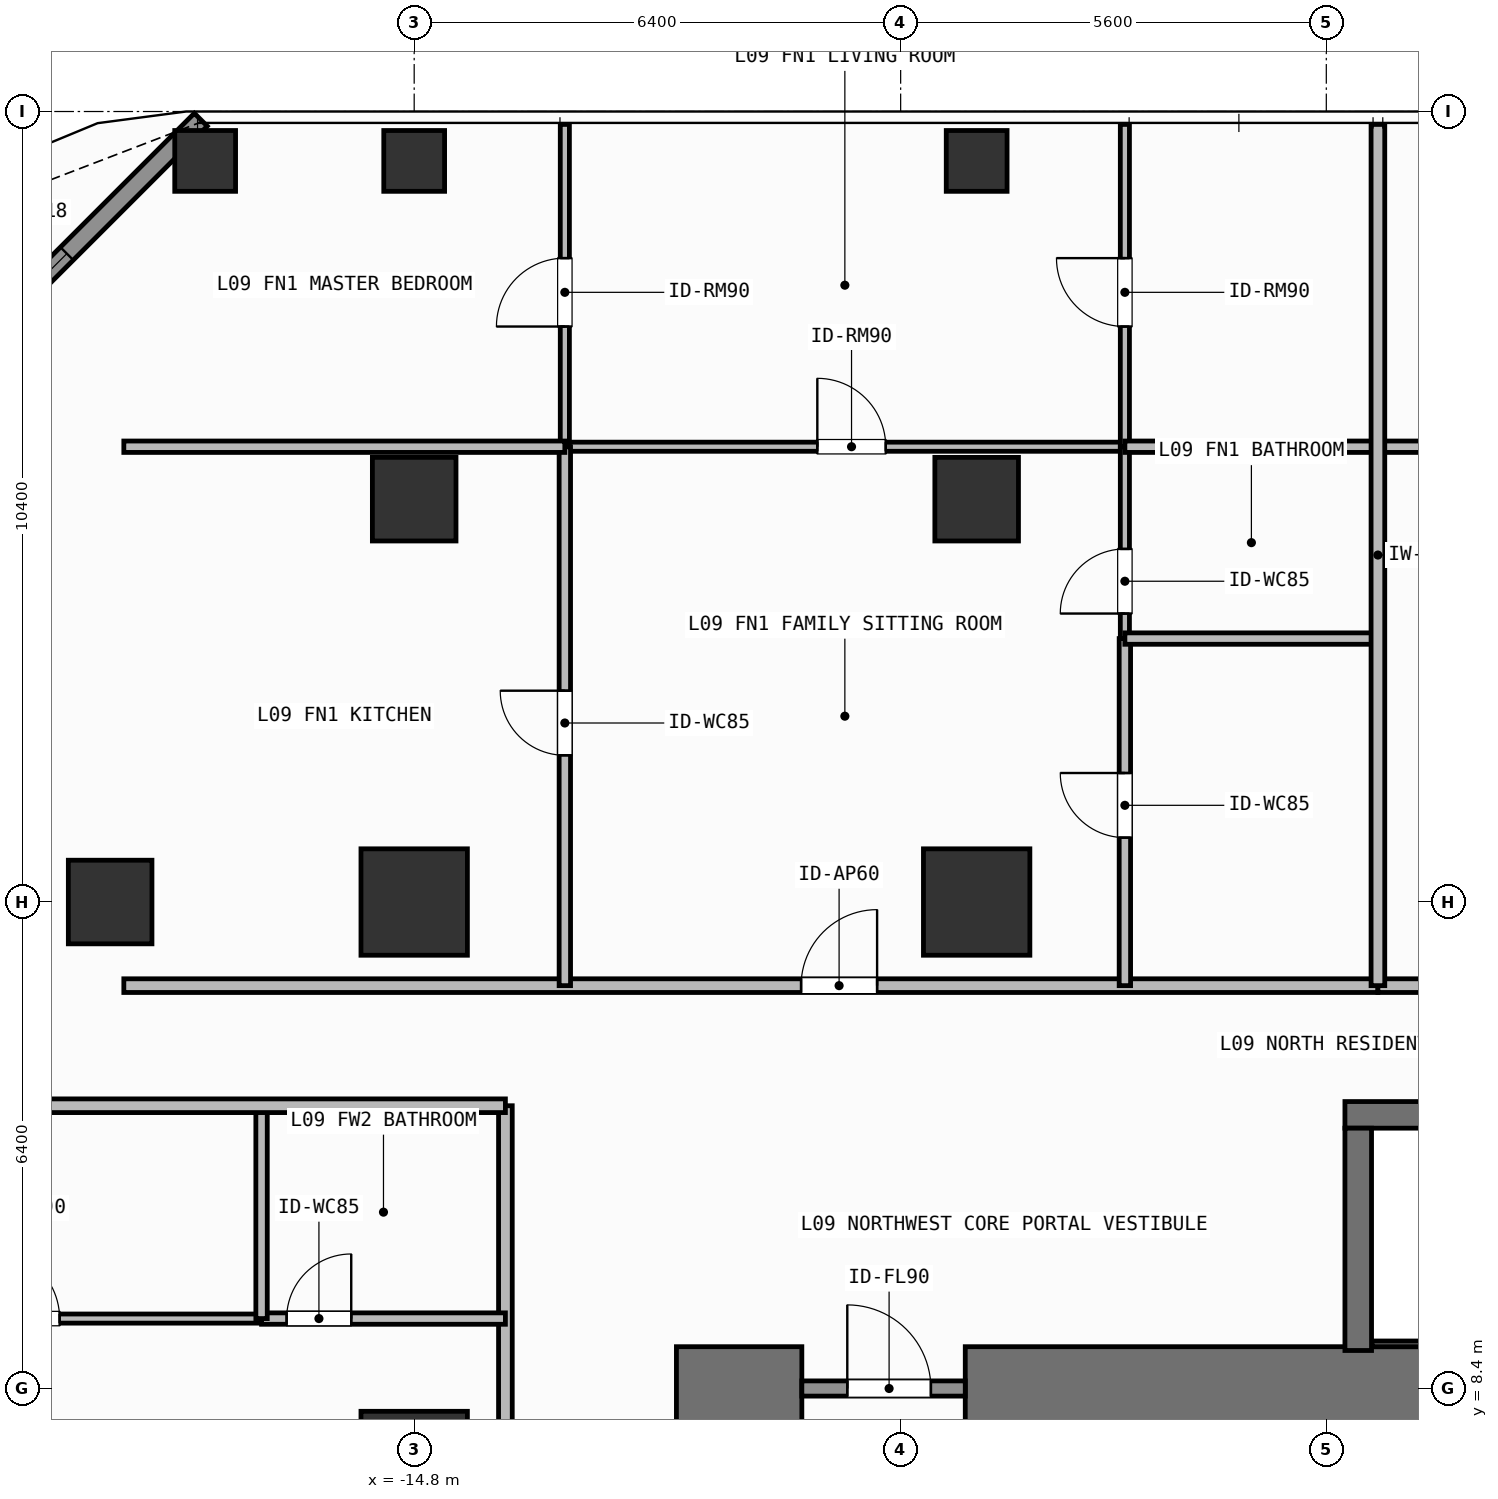
"""IFC4 building model, lengths in metres.
Left out: names, types, materials, properties, quantities, classifications, styles, units other than length and angle.
Written with IfcOpenShell. Run it as: python <this file> out.ifc"""

import sys

from ifc_helpers import new_model, si_unit, direction, frame, frame_2d, origin, origin_2d, place, context, subcontext, project, spatial, rectangle, hollow_rectangle, extrude, element, fill, save


model = new_model("IFC4")
c1 = context("Model", 3, precision=1e-05, world=origin(), true_north=direction((0.0, 1.0)))
c2 = subcontext(c1, "Body", "Model", "MODEL_VIEW")
j1 = project(units=[si_unit("LENGTHUNIT", "METRE"), si_unit("PLANEANGLEUNIT", "RADIAN")], contexts=[c1])
p1 = place(None, origin())
s1 = spatial("IfcSite", under=j1, at=p1, CompositionType="ELEMENT")
p2 = place(p1, origin())
s2 = spatial("IfcBuilding", under=s1, at=p2, CompositionType="ELEMENT")
p3 = place(p2, frame((0.0, 0.0, 34.5)))
s3 = spatial("IfcBuildingStorey", under=s2, at=p3, CompositionType="ELEMENT", Elevation=34.5)
p4 = place(p3, frame((-11.35, 8.4, 0.0), z_axis=(0.0, 0.0, 1.0), x_axis=(1.0, 0.0, 0.0)))
e1 = element("IfcWall", 1, at=p4, inside=s3, PredefinedType="SHEAR", context=c2, shape_type="SweptSolid", body=[
    extrude(rectangle(XDim=1.65, YDim=1.1, at=frame_2d((0.825, 0.0))), origin(), (0.0, 0.0, 1.0), 3.9),
])
p5 = place(p3, frame((-7.55, 8.4, 0.0), z_axis=(0.0, 0.0, 1.0), x_axis=(1.0, 0.0, 0.0)))
e2 = element("IfcWall", 2, at=p5, inside=s3, PredefinedType="SHEAR", context=c2, shape_type="SweptSolid", body=[
    extrude(rectangle(XDim=16.5, YDim=1.1, at=frame_2d((8.25, 0.0))), origin(), (0.0, 0.0, 1.0), 3.9),
])
p6 = place(p3, frame((-2.555, 12.0, 0.0), z_axis=(0.0, 0.0, 1.0), x_axis=(1.0, 0.0, 0.0)))
e3 = element("IfcWall", 3, at=p6, inside=s3, PredefinedType="SHEAR", context=c2, shape_type="SweptSolid", body=[
    extrude(rectangle(XDim=7.31, YDim=0.35, at=frame_2d((3.655, 0.0))), origin(), (0.0, 0.0, 1.0), 3.9),
])
p7 = place(p3, frame((-2.2, 8.988, 0.0), z_axis=(0.0, 0.0, 1.0), x_axis=(1.0, 0.0, 0.0)))
e4 = element("IfcWall", 4, at=p7, inside=s3, PredefinedType="SHEAR", context=c2, shape_type="SweptSolid", body=[
    extrude(rectangle(XDim=6.6, YDim=0.075, at=frame_2d((3.3, 0.0))), origin(), (0.0, 0.0, 1.0), 3.9),
])
p8 = place(p3, frame((-2.38, 8.9, 0.0), z_axis=(0.0, 0.0, 1.0), x_axis=(0.0, 1.0, 0.0)))
e5 = element("IfcWall", 5, at=p8, inside=s3, PredefinedType="SHEAR", context=c2, shape_type="SweptSolid", body=[
    extrude(rectangle(XDim=2.925, YDim=0.35, at=frame_2d((1.462, 0.0))), origin(), (0.0, 0.0, 1.0), 3.9),
])
for number, where, z_axis, x_axis in (
    (6, (-14.8, 14.8, 0.0), (0.0, 0.0, 1.0), (1.0, 0.0, 0.0)),
    (7, (-7.4, 14.8, 0.0), (0.0, 0.0, 1.0), (1.0, 0.0, 0.0)),
    (8, (-14.8, 7.4, 0.0), (0.0, 0.0, 1.0), (1.0, 0.0, 0.0)),
):
    element("IfcColumn", number, at=place(p3, frame(where, z_axis=z_axis, x_axis=x_axis)), inside=s3, PredefinedType="COLUMN", context=c2, shape_type="SweptSolid", body=[
        extrude(rectangle(XDim=1.4, YDim=1.4, at=origin_2d()), origin(), (0.0, 0.0, 1.0), 3.9),
    ])
for number, where, z_axis, x_axis in (
    (9, (-18.8, 14.8, 0.0), (0.0, 0.0, 1.0), (1.0, 0.0, 0.0)),
    (10, (-14.8, 20.1, 0.0), (0.0, 0.0, 1.0), (1.0, 0.0, 0.0)),
    (11, (-7.4, 20.1, 0.0), (0.0, 0.0, 1.0), (1.0, 0.0, 0.0)),
):
    element("IfcColumn", number, at=place(p3, frame(where, z_axis=z_axis, x_axis=x_axis)), inside=s3, PredefinedType="COLUMN", context=c2, shape_type="SweptSolid", body=[
        extrude(rectangle(XDim=1.1, YDim=1.1, at=origin_2d()), origin(), (0.0, 0.0, 1.0), 3.9),
    ])
for number, where, z_axis, x_axis in (
    (12, (-17.55, 24.55, 0.0), (0.0, 0.0, 1.0), (1.0, 0.0, 0.0)),
    (13, (-14.8, 24.55, 0.0), (0.0, 0.0, 1.0), (1.0, 0.0, 0.0)),
    (14, (-7.4, 24.55, 0.0), (0.0, 0.0, 1.0), (1.0, 0.0, 0.0)),
):
    element("IfcColumn", number, at=place(p3, frame(where, z_axis=z_axis, x_axis=x_axis)), inside=s3, PredefinedType="COLUMN", context=c2, shape_type="SweptSolid", body=[
        extrude(hollow_rectangle(XDim=0.8, YDim=0.8, WallThickness=0.036, at=origin_2d()), origin(), (0.0, 0.0, 1.0), 3.9),
    ])
p9 = place(p3, frame((-22.192, 20.508, 0.0), z_axis=(0.0, 0.0, 1.0), x_axis=(0.707106781187, 0.707106781187, 0.0)))
e15 = element("IfcWall", 15, at=p9, inside=s3, PredefinedType="SOLIDWALL", context=c2, shape_type="SweptSolid", body=[
    extrude(rectangle(XDim=6.484, YDim=0.24, at=frame_2d((3.242, 0.0))), origin(), (0.0, 0.0, 1.0), 3.68),
])
p10 = place(p9, frame((2.492, 0.0, 0.8)))
e16 = element("IfcOpeningElement", 16, at=p10, cuts=e15, PredefinedType="OPENING", context=c2, shape_type="SweptSolid", body=[
    extrude(rectangle(XDim=1.5, YDim=1.85, at=frame_2d((0.75, 0.925))), frame((0.0, 0.13, 0.0), z_axis=(0.0, -1.0, 0.0), x_axis=(1.0, 0.0, 0.0)), (0.0, 0.0, 1.0), 0.26),
])
p11 = place(p3, frame((-9.7, 8.4, 0.0), z_axis=(0.0, 0.0, 1.0), x_axis=(1.0, 0.0, 0.0)))
e17 = element("IfcWall", 17, at=p11, inside=s3, PredefinedType="SOLIDWALL", context=c2, shape_type="SweptSolid", body=[
    extrude(rectangle(XDim=2.15, YDim=0.2, at=frame_2d((1.075, 0.0))), origin(), (0.0, 0.0, 1.0), 2.72),
])
p12 = place(p11, frame((0.598, 0.0, 0.0)))
e18 = element("IfcOpeningElement", 18, at=p12, cuts=e17, PredefinedType="OPENING", context=c2, shape_type="SweptSolid", body=[
    extrude(rectangle(XDim=1.1, YDim=2.15, at=frame_2d((0.55, 1.075))), frame((0.0, 0.11, 0.0), z_axis=(0.0, -1.0, 0.0), x_axis=(1.0, 0.0, 0.0)), (0.0, 0.0, 1.0), 0.22),
])
p13 = place(p3, frame((-18.62, 13.7, 0.0), z_axis=(0.0, 0.0, 1.0), x_axis=(1.0, 0.0, 0.0)))
e19 = element("IfcWall", 19, at=p13, inside=s3, PredefinedType="PARTITIONING", context=c2, shape_type="SweptSolid", body=[
    extrude(rectangle(XDim=16.499, YDim=0.18, at=frame_2d((8.25, 0.0))), origin(), (0.0, 0.0, 1.0), 3.68),
])
p14 = place(p13, frame((8.91, 0.0, 0.0)))
e20 = element("IfcOpeningElement", 20, at=p14, cuts=e19, PredefinedType="OPENING", context=c2, shape_type="SweptSolid", body=[
    extrude(rectangle(XDim=1.0, YDim=2.2, at=frame_2d((0.5, 1.1))), frame((0.0, 0.1, 0.0), z_axis=(0.0, -1.0, 0.0), x_axis=(1.0, 0.0, 0.0)), (0.0, 0.0, 1.0), 0.2),
])
p15 = place(p3, frame((-12.818, 20.79, 0.0), z_axis=(0.0, 0.0, 1.0), x_axis=(1.0, 0.0, 0.0)))
e21 = element("IfcWall", 21, at=p15, inside=s3, PredefinedType="PARTITIONING", context=c2, shape_type="SweptSolid", body=[
    extrude(rectangle(XDim=7.368, YDim=0.12, at=frame_2d((3.684, 0.0))), origin(), (0.0, 0.0, 1.0), 3.68),
])
p16 = place(p15, frame((3.322, 0.0, 0.0)))
e22 = element("IfcOpeningElement", 22, at=p16, cuts=e21, PredefinedType="OPENING", context=c2, shape_type="SweptSolid", body=[
    extrude(rectangle(XDim=0.9, YDim=2.1, at=frame_2d((0.45, 1.05))), frame((0.0, 0.07, 0.0), z_axis=(0.0, -1.0, 0.0), x_axis=(1.0, 0.0, 0.0)), (0.0, 0.0, 1.0), 0.14),
])
p17 = place(p3, frame((-12.818, 13.7, 0.0), z_axis=(0.0, 0.0, 1.0), x_axis=(0.0, 1.0, 0.0)))
e23 = element("IfcWall", 23, at=p17, inside=s3, PredefinedType="PARTITIONING", context=c2, shape_type="SweptSolid", body=[
    extrude(rectangle(XDim=7.09, YDim=0.15, at=frame_2d((3.545, 0.0))), origin(), (0.0, 0.0, 1.0), 3.68),
])
p18 = place(p17, frame((3.03, 0.0, 0.0)))
e24 = element("IfcOpeningElement", 24, at=p18, cuts=e23, PredefinedType="OPENING", context=c2, shape_type="SweptSolid", body=[
    extrude(rectangle(XDim=0.85, YDim=2.1, at=frame_2d((0.425, 1.05))), frame((0.0, 0.085, 0.0), z_axis=(0.0, -1.0, 0.0), x_axis=(1.0, 0.0, 0.0)), (0.0, 0.0, 1.0), 0.17),
])
p19 = place(p3, frame((-12.818, 20.79, 0.0), z_axis=(0.0, 0.0, 1.0), x_axis=(0.0, 1.0, 0.0)))
e25 = element("IfcWall", 25, at=p19, inside=s3, PredefinedType="PARTITIONING", context=c2, shape_type="SweptSolid", body=[
    extrude(rectangle(XDim=4.24, YDim=0.12, at=frame_2d((2.12, 0.0))), origin(), (0.0, 0.0, 1.0), 3.68),
])
p20 = place(p19, frame((1.581, 0.0, 0.0)))
e26 = element("IfcOpeningElement", 26, at=p20, cuts=e25, PredefinedType="OPENING", context=c2, shape_type="SweptSolid", body=[
    extrude(rectangle(XDim=0.9, YDim=2.1, at=frame_2d((0.45, 1.05))), frame((0.0, 0.07, 0.0), z_axis=(0.0, -1.0, 0.0), x_axis=(1.0, 0.0, 0.0)), (0.0, 0.0, 1.0), 0.14),
])
p21 = place(p3, frame((-5.45, 13.7, 0.0), z_axis=(0.0, 0.0, 1.0), x_axis=(0.0, 1.0, 0.0)))
e27 = element("IfcWall", 27, at=p21, inside=s3, PredefinedType="PARTITIONING", context=c2, shape_type="SweptSolid", body=[
    extrude(rectangle(XDim=4.566, YDim=0.15, at=frame_2d((2.283, 0.0))), origin(), (0.0, 0.0, 1.0), 3.68),
])
p22 = place(p21, frame((1.948, 0.0, 0.0)))
e28 = element("IfcOpeningElement", 28, at=p22, cuts=e27, PredefinedType="OPENING", context=c2, shape_type="SweptSolid", body=[
    extrude(rectangle(XDim=0.85, YDim=2.1, at=frame_2d((0.425, 1.05))), frame((0.0, 0.085, 0.0), z_axis=(0.0, -1.0, 0.0), x_axis=(1.0, 0.0, 0.0)), (0.0, 0.0, 1.0), 0.17),
])
p23 = place(p3, frame((-5.45, 18.266, 0.0), z_axis=(0.0, 0.0, 1.0), x_axis=(0.0, 1.0, 0.0)))
e29 = element("IfcWall", 29, at=p23, inside=s3, PredefinedType="PARTITIONING", context=c2, shape_type="SweptSolid", body=[
    extrude(rectangle(XDim=2.524, YDim=0.12, at=frame_2d((1.262, 0.0))), origin(), (0.0, 0.0, 1.0), 3.68),
])
p24 = place(p23, frame((0.329, 0.0, 0.0)))
e30 = element("IfcOpeningElement", 30, at=p24, cuts=e29, PredefinedType="OPENING", context=c2, shape_type="SweptSolid", body=[
    extrude(rectangle(XDim=0.85, YDim=2.1, at=frame_2d((0.425, 1.05))), frame((0.0, 0.07, 0.0), z_axis=(0.0, -1.0, 0.0), x_axis=(1.0, 0.0, 0.0)), (0.0, 0.0, 1.0), 0.14),
])
p25 = place(p3, frame((-5.45, 20.79, 0.0), z_axis=(0.0, 0.0, 1.0), x_axis=(0.0, 1.0, 0.0)))
e31 = element("IfcWall", 31, at=p25, inside=s3, PredefinedType="PARTITIONING", context=c2, shape_type="SweptSolid", body=[
    extrude(rectangle(XDim=4.24, YDim=0.12, at=frame_2d((2.12, 0.0))), origin(), (0.0, 0.0, 1.0), 3.68),
])
p26 = place(p25, frame((1.581, 0.0, 0.0)))
e32 = element("IfcOpeningElement", 32, at=p26, cuts=e31, PredefinedType="OPENING", context=c2, shape_type="SweptSolid", body=[
    extrude(rectangle(XDim=0.9, YDim=2.1, at=frame_2d((0.45, 1.05))), frame((0.0, 0.07, 0.0), z_axis=(0.0, -1.0, 0.0), x_axis=(1.0, 0.0, 0.0)), (0.0, 0.0, 1.0), 0.14),
])
p27 = place(p3, frame((-2.121, 13.7, 0.0), z_axis=(0.0, 0.0, 1.0), x_axis=(1.0, 0.0, 0.0)))
e33 = element("IfcWall", 33, at=p27, inside=s3, PredefinedType="PARTITIONING", context=c2, shape_type="SweptSolid", body=[
    extrude(rectangle(XDim=11.226, YDim=0.18, at=frame_2d((5.613, 0.0))), origin(), (0.0, 0.0, 1.0), 3.68),
])
p28 = place(p27, frame((5.29, 0.0, 0.0)))
e34 = element("IfcOpeningElement", 34, at=p28, cuts=e33, PredefinedType="OPENING", context=c2, shape_type="SweptSolid", body=[
    extrude(rectangle(XDim=1.0, YDim=2.2, at=frame_2d((0.5, 1.1))), frame((0.0, 0.1, 0.0), z_axis=(0.0, -1.0, 0.0), x_axis=(1.0, 0.0, 0.0)), (0.0, 0.0, 1.0), 0.2),
])
p29 = place(p3, frame((-13.6, 0.727, 0.0), z_axis=(0.0, 0.0, 1.0), x_axis=(0.0, 1.0, 0.0)))
e35 = element("IfcWall", 35, at=p29, inside=s3, PredefinedType="PARTITIONING", context=c2, shape_type="SweptSolid", body=[
    extrude(rectangle(XDim=11.393, YDim=0.18, at=frame_2d((5.697, 0.0))), origin(), (0.0, 0.0, 1.0), 3.68),
])
p30 = place(p29, frame((4.837, 0.0, 0.0)))
e36 = element("IfcOpeningElement", 36, at=p30, cuts=e35, PredefinedType="OPENING", context=c2, shape_type="SweptSolid", body=[
    extrude(rectangle(XDim=1.0, YDim=2.2, at=frame_2d((0.5, 1.1))), frame((0.0, 0.1, 0.0), z_axis=(0.0, -1.0, 0.0), x_axis=(1.0, 0.0, 0.0)), (0.0, 0.0, 1.0), 0.2),
])
p31 = place(p3, frame((-16.808, 9.32, 0.0), z_axis=(0.0, 0.0, 1.0), x_axis=(1.0, 0.0, 0.0)))
e37 = element("IfcWall", 37, at=p31, inside=s3, PredefinedType="PARTITIONING", context=c2, shape_type="SweptSolid", body=[
    extrude(rectangle(XDim=3.208, YDim=0.15, at=frame_2d((1.604, 0.0))), origin(), (0.0, 0.0, 1.0), 3.68),
])
p32 = place(p31, frame((0.33, 0.0, 0.0)))
e38 = element("IfcOpeningElement", 38, at=p32, cuts=e37, PredefinedType="OPENING", context=c2, shape_type="SweptSolid", body=[
    extrude(rectangle(XDim=0.85, YDim=2.1, at=frame_2d((0.425, 1.05))), frame((0.0, 0.085, 0.0), z_axis=(0.0, -1.0, 0.0), x_axis=(1.0, 0.0, 0.0)), (0.0, 0.0, 1.0), 0.17),
])
p33 = place(p3, frame((-22.13, 9.32, 0.0), z_axis=(0.0, 0.0, 1.0), x_axis=(1.0, 0.0, 0.0)))
e39 = element("IfcWall", 39, at=p33, inside=s3, PredefinedType="PARTITIONING", context=c2, shape_type="SweptSolid", body=[
    extrude(rectangle(XDim=5.322, YDim=0.12, at=frame_2d((2.661, 0.0))), origin(), (0.0, 0.0, 1.0), 3.68),
])
p34 = place(p33, frame((1.765, 0.0, 0.0)))
e40 = element("IfcOpeningElement", 40, at=p34, cuts=e39, PredefinedType="OPENING", context=c2, shape_type="SweptSolid", body=[
    extrude(rectangle(XDim=0.9, YDim=2.1, at=frame_2d((0.45, 1.05))), frame((0.0, 0.07, 0.0), z_axis=(0.0, -1.0, 0.0), x_axis=(1.0, 0.0, 0.0)), (0.0, 0.0, 1.0), 0.14),
])
p35 = place(p3, frame((-18.62, 20.79, 0.0), z_axis=(0.0, 0.0, 1.0), x_axis=(1.0, 0.0, 0.0)))
e41 = element("IfcWall", 41, at=p35, inside=s3, PredefinedType="PARTITIONING", context=c2, shape_type="SweptSolid", body=[
    extrude(rectangle(XDim=5.802, YDim=0.15, at=frame_2d((2.901, 0.0))), origin(), (0.0, 0.0, 1.0), 3.68),
])
for number, where, z_axis, x_axis in (
    (42, (-5.45, 18.266, 0.0), (0.0, 0.0, 1.0), (1.0, 0.0, 0.0)),
    (43, (-5.45, 20.79, 0.0), (0.0, 0.0, 1.0), (1.0, 0.0, 0.0)),
):
    element("IfcWall", number, at=place(p3, frame(where, z_axis=z_axis, x_axis=x_axis)), inside=s3, PredefinedType="PARTITIONING", context=c2, shape_type="SweptSolid", body=[
        extrude(rectangle(XDim=3.329, YDim=0.15, at=frame_2d((1.665, 0.0))), origin(), (0.0, 0.0, 1.0), 3.68),
    ])
p36 = place(p3, frame((-2.121, 20.79, 0.0), z_axis=(0.0, 0.0, 1.0), x_axis=(1.0, 0.0, 0.0)))
e44 = element("IfcWall", 44, at=p36, inside=s3, PredefinedType="PARTITIONING", context=c2, shape_type="SweptSolid", body=[
    extrude(rectangle(XDim=4.1, YDim=0.15, at=frame_2d((2.05, 0.0))), origin(), (0.0, 0.0, 1.0), 3.68),
])
p37 = place(p3, frame((-2.121, 13.7, 0.0), z_axis=(0.0, 0.0, 1.0), x_axis=(0.0, 1.0, 0.0)))
e45 = element("IfcWall", 45, at=p37, inside=s3, PredefinedType="PARTITIONING", context=c2, shape_type="SweptSolid", body=[
    extrude(rectangle(XDim=11.33, YDim=0.18, at=frame_2d((5.665, 0.0))), origin(), (0.0, 0.0, 1.0), 3.68),
])
p38 = place(p3, frame((-16.808, 9.32, 0.0), z_axis=(0.0, 0.0, 1.0), x_axis=(0.0, 1.0, 0.0)))
e46 = element("IfcWall", 46, at=p38, inside=s3, PredefinedType="PARTITIONING", context=c2, shape_type="SweptSolid", body=[
    extrude(rectangle(XDim=2.8, YDim=0.15, at=frame_2d((1.4, 0.0))), origin(), (0.0, 0.0, 1.0), 3.68),
])
p39 = place(p3, frame((-22.13, 12.12, 0.0), z_axis=(0.0, 0.0, 1.0), x_axis=(1.0, 0.0, 0.0)))
e47 = element("IfcWall", 47, at=p39, inside=s3, PredefinedType="PARTITIONING", context=c2, shape_type="SweptSolid", body=[
    extrude(rectangle(XDim=8.53, YDim=0.18, at=frame_2d((4.265, 0.0))), origin(), (0.0, 0.0, 1.0), 3.68),
])
p40 = place(p10, origin())
e48 = element("IfcWindow", 48, at=p40, inside=s3, PartitioningType="SINGLE_PANEL", PredefinedType="WINDOW", context=c2, shape_type="SweptSolid", body=[
    extrude(rectangle(XDim=1.5, YDim=1.85, at=frame_2d((0.75, 0.925))), frame((0.0, 0.03, 0.0), z_axis=(0.0, -1.0, 0.0), x_axis=(1.0, 0.0, 0.0)), (0.0, 0.0, 1.0), 0.06),
])
fill(e16, e48)
p41 = place(p12, origin())
e49 = element("IfcDoor", 49, at=p41, inside=s3, OperationType="SINGLE_SWING_LEFT", PredefinedType="DOOR", context=c2, shape_type="SweptSolid", body=[
    extrude(rectangle(XDim=1.1, YDim=2.15, at=frame_2d((0.55, 1.075))), frame((0.0, 0.025, 0.0), z_axis=(0.0, -1.0, 0.0), x_axis=(1.0, 0.0, 0.0)), (0.0, 0.0, 1.0), 0.05),
])
fill(e18, e49)
p42 = place(p14, origin())
e50 = element("IfcDoor", 50, at=p42, inside=s3, OperationType="SINGLE_SWING_RIGHT", PredefinedType="DOOR", context=c2, shape_type="SweptSolid", body=[
    extrude(rectangle(XDim=1.0, YDim=2.2, at=frame_2d((0.5, 1.1))), frame((0.0, 0.025, 0.0), z_axis=(0.0, -1.0, 0.0), x_axis=(1.0, 0.0, 0.0)), (0.0, 0.0, 1.0), 0.05),
])
fill(e20, e50)
p43 = place(p16, origin())
e51 = element("IfcDoor", 51, at=p43, inside=s3, OperationType="SINGLE_SWING_LEFT", PredefinedType="DOOR", context=c2, shape_type="SweptSolid", body=[
    extrude(rectangle(XDim=0.9, YDim=2.1, at=frame_2d((0.45, 1.05))), frame((0.0, 0.025, 0.0), z_axis=(0.0, -1.0, 0.0), x_axis=(1.0, 0.0, 0.0)), (0.0, 0.0, 1.0), 0.05),
])
fill(e22, e51)
p44 = place(p18, origin())
e52 = element("IfcDoor", 52, at=p44, inside=s3, OperationType="SINGLE_SWING_RIGHT", PredefinedType="DOOR", context=c2, shape_type="SweptSolid", body=[
    extrude(rectangle(XDim=0.85, YDim=2.1, at=frame_2d((0.425, 1.05))), frame((0.0, 0.025, 0.0), z_axis=(0.0, -1.0, 0.0), x_axis=(1.0, 0.0, 0.0)), (0.0, 0.0, 1.0), 0.05),
])
fill(e24, e52)
p45 = place(p20, origin())
e53 = element("IfcDoor", 53, at=p45, inside=s3, OperationType="SINGLE_SWING_LEFT", PredefinedType="DOOR", context=c2, shape_type="SweptSolid", body=[
    extrude(rectangle(XDim=0.9, YDim=2.1, at=frame_2d((0.45, 1.05))), frame((0.0, 0.025, 0.0), z_axis=(0.0, -1.0, 0.0), x_axis=(1.0, 0.0, 0.0)), (0.0, 0.0, 1.0), 0.05),
])
fill(e26, e53)
p46 = place(p22, origin())
e54 = element("IfcDoor", 54, at=p46, inside=s3, OperationType="SINGLE_SWING_RIGHT", PredefinedType="DOOR", context=c2, shape_type="SweptSolid", body=[
    extrude(rectangle(XDim=0.85, YDim=2.1, at=frame_2d((0.425, 1.05))), frame((0.0, 0.025, 0.0), z_axis=(0.0, -1.0, 0.0), x_axis=(1.0, 0.0, 0.0)), (0.0, 0.0, 1.0), 0.05),
])
fill(e28, e54)
p47 = place(p24, origin())
e55 = element("IfcDoor", 55, at=p47, inside=s3, OperationType="SINGLE_SWING_LEFT", PredefinedType="DOOR", context=c2, shape_type="SweptSolid", body=[
    extrude(rectangle(XDim=0.85, YDim=2.1, at=frame_2d((0.425, 1.05))), frame((0.0, 0.025, 0.0), z_axis=(0.0, -1.0, 0.0), x_axis=(1.0, 0.0, 0.0)), (0.0, 0.0, 1.0), 0.05),
])
fill(e30, e55)
p48 = place(p26, origin())
e56 = element("IfcDoor", 56, at=p48, inside=s3, OperationType="SINGLE_SWING_RIGHT", PredefinedType="DOOR", context=c2, shape_type="SweptSolid", body=[
    extrude(rectangle(XDim=0.9, YDim=2.1, at=frame_2d((0.45, 1.05))), frame((0.0, 0.025, 0.0), z_axis=(0.0, -1.0, 0.0), x_axis=(1.0, 0.0, 0.0)), (0.0, 0.0, 1.0), 0.05),
])
fill(e32, e56)
p49 = place(p32, origin())
e57 = element("IfcDoor", 57, at=p49, inside=s3, OperationType="SINGLE_SWING_RIGHT", PredefinedType="DOOR", context=c2, shape_type="SweptSolid", body=[
    extrude(rectangle(XDim=0.85, YDim=2.1, at=frame_2d((0.425, 1.05))), frame((0.0, 0.025, 0.0), z_axis=(0.0, -1.0, 0.0), x_axis=(1.0, 0.0, 0.0)), (0.0, 0.0, 1.0), 0.05),
])
fill(e38, e57)
p50 = place(p34, origin())
e58 = element("IfcDoor", 58, at=p50, inside=s3, OperationType="SINGLE_SWING_LEFT", PredefinedType="DOOR", context=c2, shape_type="SweptSolid", body=[
    extrude(rectangle(XDim=0.9, YDim=2.1, at=frame_2d((0.45, 1.05))), frame((0.0, 0.025, 0.0), z_axis=(0.0, -1.0, 0.0), x_axis=(1.0, 0.0, 0.0)), (0.0, 0.0, 1.0), 0.05),
])
fill(e40, e58)
save(model, sys.argv[1])
